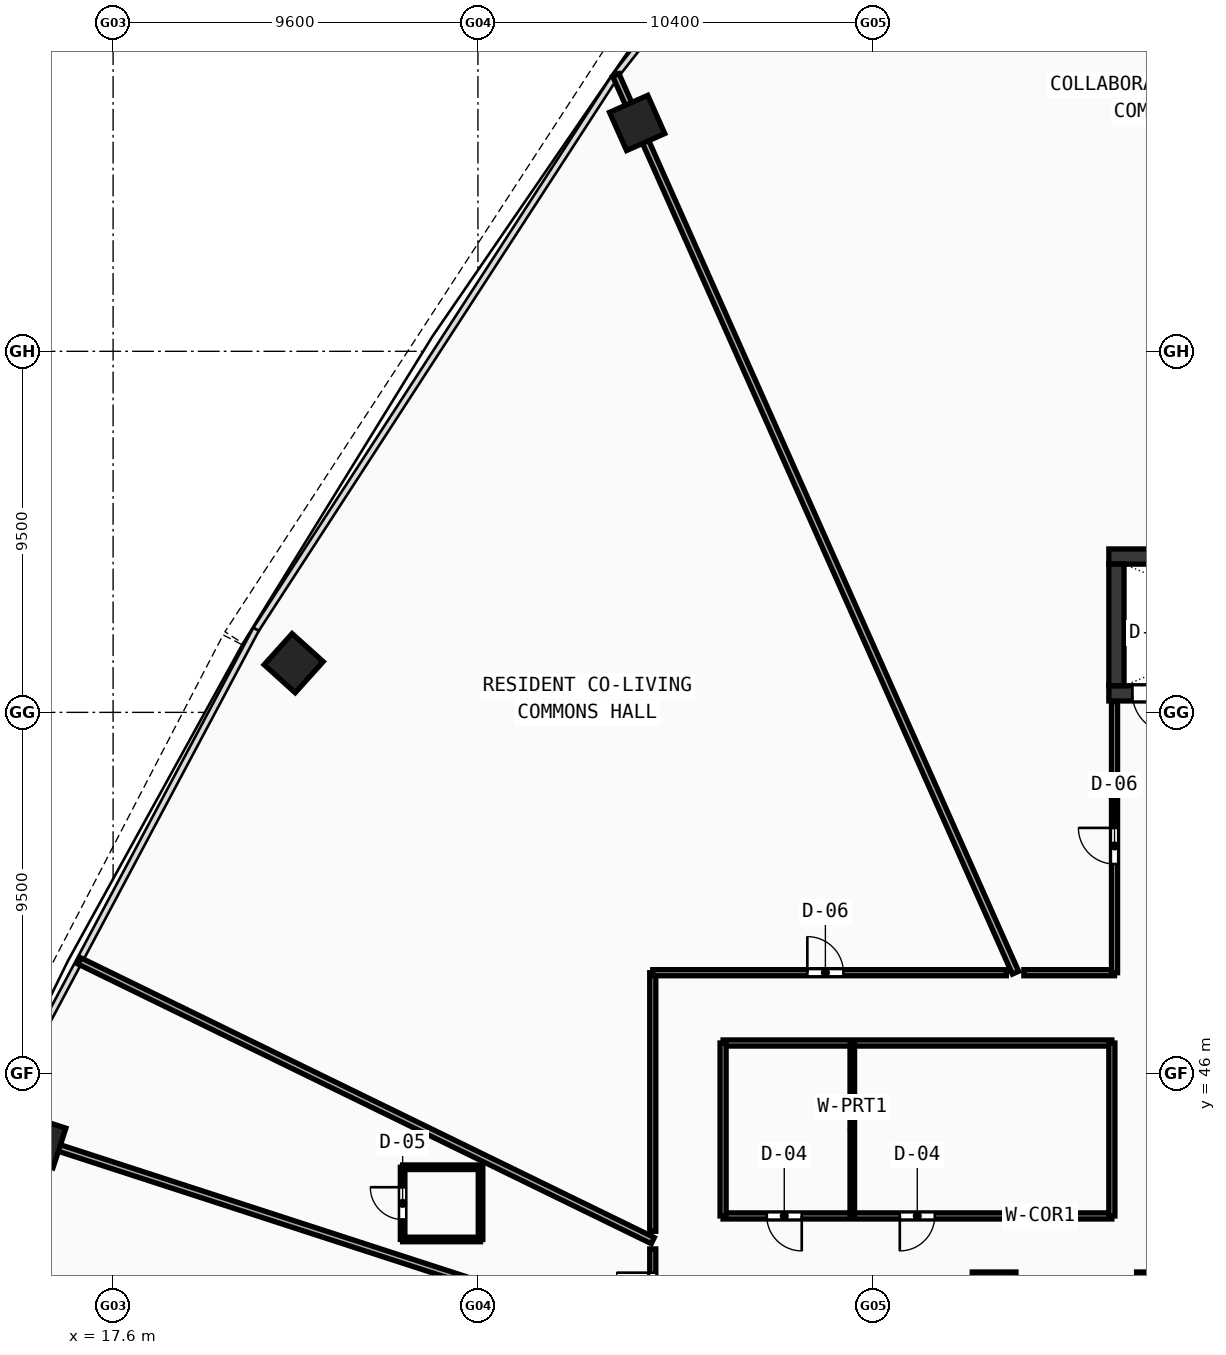
"""IFC4 building model, lengths in metres.
Left out: names, types, materials, properties, quantities, classifications, styles, units other than length and angle.
Written with IfcOpenShell. Run it as: python <this file> out.ifc"""

import sys

from ifc_helpers import new_model, si_unit, direction, frame, frame_2d, origin, origin_with_axes, origin_2d, place, context, subcontext, project, spatial, rectangle, hollow_rectangle, extrude, source, transform, mapped, element, fill, save


model = new_model("IFC4")
c1 = context("Model", 3, precision=1e-05, world=origin(), true_north=direction((0.0, 1.0)))
c2 = subcontext(c1, "Body", "Model", "MODEL_VIEW")
j1 = project(units=[si_unit("LENGTHUNIT", "METRE"), si_unit("PLANEANGLEUNIT", "RADIAN")], contexts=[c1])
p1 = place(None, origin())
s1 = spatial("IfcSite", under=j1, at=p1, CompositionType="ELEMENT")
p2 = place(p1, origin())
s2 = spatial("IfcBuilding", under=s1, at=p2, CompositionType="ELEMENT")
p3 = place(p2, frame((0.0, 0.0, 59.44)))
s3 = spatial("IfcBuildingStorey", under=s2, at=p3, CompositionType="ELEMENT", Elevation=59.44)
p4 = place(p3, frame((43.8, 59.6, 0.0), z_axis=(0.0, 0.0, 1.0), x_axis=(1.0, 0.0, 0.0)))
e1 = element("IfcWall", 1, at=p4, inside=s3, PredefinedType="SHEAR", context=c2, shape_type="SweptSolid", body=[
    extrude(rectangle(XDim=8.5, YDim=0.4, at=frame_2d((4.25, 0.0))), origin(), (0.0, 0.0, 1.0), 3.37),
])
p5 = place(p3, frame((43.8, 56.0, 0.0), z_axis=(0.0, 0.0, 1.0), x_axis=(1.0, 0.0, 0.0)))
e2 = element("IfcWall", 2, at=p5, inside=s3, PredefinedType="SHEAR", context=c2, shape_type="SweptSolid", body=[
    extrude(rectangle(XDim=8.5, YDim=0.4, at=frame_2d((4.25, 0.0))), origin(), (0.0, 0.0, 1.0), 3.37),
])
p6 = place(p5, frame((0.62, 0.0, 0.0)))
e3 = element("IfcOpeningElement", 3, at=p6, cuts=e2, PredefinedType="OPENING", context=c2, shape_type="SweptSolid", body=[
    extrude(rectangle(XDim=1.05, YDim=2.1, at=frame_2d((0.525, 1.05))), frame((0.0, 0.21, 0.0), z_axis=(0.0, -1.0, 0.0), x_axis=(1.0, 0.0, 0.0)), (0.0, 0.0, 1.0), 0.42),
])
p7 = place(p3, frame((44.0, 56.2, 0.0), z_axis=(0.0, 0.0, 1.0), x_axis=(0.0, 1.0, 0.0)))
e4 = element("IfcWall", 4, at=p7, inside=s3, PredefinedType="SHEAR", context=c2, shape_type="SweptSolid", body=[
    extrude(rectangle(XDim=3.2, YDim=0.4, at=frame_2d((1.6, 0.0))), origin(), (0.0, 0.0, 1.0), 3.37),
])
m1 = source(origin(), c2, "Body", "SweptSolid", [
    extrude(hollow_rectangle(XDim=1.15, YDim=1.15, WallThickness=0.048, at=origin_2d()), origin(), (0.0, 0.0, 1.0), 3.63),
])
for number, where, z_axis, x_axis in (
    (5, (45.106, 40.2, -0.26), (0.0, 0.0, 1.0), (1.0, 0.0, 0.0)),
    (6, (40.781, 40.2, -0.26), (0.0, 0.0, 1.0), (1.0, 0.0, 0.0)),
):
    element("IfcColumn", number, at=place(p3, frame(where, z_axis=z_axis, x_axis=x_axis)), inside=s3, PredefinedType="COLUMN", context=c2, shape_type="MappedRepresentation", body=[
        mapped(m1, transform((0.0, 0.0, 0.0), scale=1.0)),
    ])
m2 = source(origin(), c2, "Body", "SweptSolid", [
    extrude(hollow_rectangle(XDim=1.1, YDim=1.1, WallThickness=0.045, at=origin_2d()), origin(), (0.0, 0.0, 1.0), 3.63),
])
for number, where, z_axis, x_axis in (
    (7, (31.389, 71.009, -0.26), (0.0, 0.0, 1.0), (-0.914, -0.407, 0.0)),
    (8, (22.351, 56.794, -0.26), (0.0, 0.0, 1.0), (-0.669, -0.743, 0.0)),
    (9, (15.665, 44.206, -0.26), (0.0, 0.0, 1.0), (-0.309, -0.951, 0.0)),
):
    element("IfcColumn", number, at=place(p3, frame(where, z_axis=z_axis, x_axis=x_axis)), inside=s3, PredefinedType="COLUMN", context=c2, shape_type="MappedRepresentation", body=[
        mapped(m2, transform((0.0, 0.0, 0.0), scale=1.0)),
    ])
p8 = place(p3, frame((33.65, 42.25, 0.0), z_axis=(0.0, 0.0, 1.0), x_axis=(1.0, 0.0, 0.0)))
e10 = element("IfcWall", 10, at=p8, inside=s3, PredefinedType="PARTITIONING", context=c2, shape_type="SweptSolid", body=[
    extrude(rectangle(XDim=10.23, YDim=0.16, at=frame_2d((5.115, 0.0))), origin(), (0.0, 0.0, 1.0), 2.67),
])
p9 = place(p8, frame((1.15, 0.0, 0.0)))
e11 = element("IfcOpeningElement", 11, at=p9, cuts=e10, PredefinedType="OPENING", context=c2, shape_type="SweptSolid", body=[
    extrude(rectangle(XDim=0.92, YDim=2.1, at=frame_2d((0.46, 1.05))), frame((0.0, 0.09, 0.0), z_axis=(0.0, -1.0, 0.0), x_axis=(1.0, 0.0, 0.0)), (0.0, 0.0, 1.0), 0.18),
])
p10 = place(p8, frame((4.65, 0.0, 0.0)))
e12 = element("IfcOpeningElement", 12, at=p10, cuts=e10, PredefinedType="OPENING", context=c2, shape_type="SweptSolid", body=[
    extrude(rectangle(XDim=0.92, YDim=2.1, at=frame_2d((0.46, 1.05))), frame((0.0, 0.09, 0.0), z_axis=(0.0, -1.0, 0.0), x_axis=(1.0, 0.0, 0.0)), (0.0, 0.0, 1.0), 0.18),
])
p11 = place(p3, frame((33.65, 46.8, 0.0), z_axis=(0.0, 0.0, 1.0), x_axis=(1.0, 0.0, 0.0)))
e13 = element("IfcWall", 13, at=p11, inside=s3, PredefinedType="PARTITIONING", context=c2, shape_type="SweptSolid", body=[
    extrude(rectangle(XDim=10.23, YDim=0.16, at=frame_2d((5.115, 0.0))), origin(), (0.0, 0.0, 1.0), 2.67),
])
for number, where, z_axis, x_axis in (
    (14, (33.65, 42.25, 0.0), (0.0, 0.0, 1.0), (0.0, 1.0, 0.0)),
    (15, (43.88, 42.25, 0.0), (0.0, 0.0, 1.0), (0.0, 1.0, 0.0)),
):
    element("IfcWall", number, at=place(p3, frame(where, z_axis=z_axis, x_axis=x_axis)), inside=s3, PredefinedType="PARTITIONING", context=c2, shape_type="SweptSolid", body=[
        extrude(rectangle(XDim=4.55, YDim=0.16, at=frame_2d((2.275, 0.0))), origin(), (0.0, 0.0, 1.0), 2.67),
    ])
p12 = place(p3, frame((37.05, 42.25, 0.0), z_axis=(0.0, 0.0, 1.0), x_axis=(0.0, 1.0, 0.0)))
e16 = element("IfcWall", 16, at=p12, inside=s3, PredefinedType="PARTITIONING", context=c2, shape_type="SweptSolid", body=[
    extrude(rectangle(XDim=4.55, YDim=0.12, at=frame_2d((2.275, 0.0))), origin(), (0.0, 0.0, 1.0), 2.67),
])
p13 = place(p3, frame((41.344, 48.65, 0.0), z_axis=(0.0, 0.0, 1.0), x_axis=(-0.406729800422, 0.913548504158, 0.0)))
e17 = element("IfcWall", 17, at=p13, inside=s3, PredefinedType="PARTITIONING", context=c2, shape_type="SweptSolid", body=[
    extrude(rectangle(XDim=25.854, YDim=0.18, at=frame_2d((12.927, 0.0))), origin(), (0.0, 0.0, 1.0), 2.67),
])
p14 = place(p3, frame((31.8, 41.601, 0.0), z_axis=(0.0, 0.0, 1.0), x_axis=(-0.898795978277, 0.438367185625, 0.0)))
e18 = element("IfcWall", 18, at=p14, inside=s3, PredefinedType="PARTITIONING", context=c2, shape_type="SweptSolid", body=[
    extrude(rectangle(XDim=16.788, YDim=0.18, at=frame_2d((8.394, 0.0))), origin(), (0.0, 0.0, 1.0), 2.67),
])
p15 = place(p3, frame((31.8, 38.964, 0.0), z_axis=(0.0, 0.0, 1.0), x_axis=(-0.951052304058, 0.309029958006, 0.0)))
e19 = element("IfcWall", 19, at=p15, inside=s3, PredefinedType="PARTITIONING", context=c2, shape_type="SweptSolid", body=[
    extrude(rectangle(XDim=18.299, YDim=0.18, at=frame_2d((9.149, 0.0))), origin(), (0.0, 0.0, 1.0), 2.67),
])
p16 = place(p3, frame((31.8, 39.195, 0.0), z_axis=(0.0, 0.0, 1.0), x_axis=(0.0, 1.0, 0.0)))
e20 = element("IfcWall", 20, at=p16, inside=s3, PredefinedType="PARTITIONING", context=c2, shape_type="SweptSolid", body=[
    extrude(rectangle(XDim=2.187, YDim=0.16, at=frame_2d((1.093, 0.0))), origin(), (0.0, 0.0, 1.0), 3.37),
])
p17 = place(p16, frame((0.613, 0.0, 0.0)))
e21 = element("IfcOpeningElement", 21, at=p17, cuts=e20, PredefinedType="OPENING", context=c2, shape_type="SweptSolid", body=[
    extrude(rectangle(XDim=0.95, YDim=2.1, at=frame_2d((0.475, 1.05))), frame((0.0, 0.09, 0.0), z_axis=(0.0, -1.0, 0.0), x_axis=(1.0, 0.0, 0.0)), (0.0, 0.0, 1.0), 0.18),
])
p18 = place(p3, frame((31.8, 41.846, 0.0), z_axis=(0.0, 0.0, 1.0), x_axis=(0.0, 1.0, 0.0)))
e22 = element("IfcWall", 22, at=p18, inside=s3, PredefinedType="PARTITIONING", context=c2, shape_type="SweptSolid", body=[
    extrude(rectangle(XDim=6.804, YDim=0.16, at=frame_2d((3.402, 0.0))), origin(), (0.0, 0.0, 1.0), 2.67),
])
p19 = place(p3, frame((31.8, 48.65, 0.0), z_axis=(0.0, 0.0, 1.0), x_axis=(1.0, 0.0, 0.0)))
e23 = element("IfcWall", 23, at=p19, inside=s3, PredefinedType="PARTITIONING", context=c2, shape_type="SweptSolid", body=[
    extrude(rectangle(XDim=9.303, YDim=0.16, at=frame_2d((4.651, 0.0))), origin(), (0.0, 0.0, 1.0), 2.97),
])
p20 = place(p19, frame((4.067, 0.0, 0.0)))
e24 = element("IfcOpeningElement", 24, at=p20, cuts=e23, PredefinedType="OPENING", context=c2, shape_type="SweptSolid", body=[
    extrude(rectangle(XDim=0.95, YDim=2.1, at=frame_2d((0.475, 1.05))), frame((0.0, 0.09, 0.0), z_axis=(0.0, -1.0, 0.0), x_axis=(1.0, 0.0, 0.0)), (0.0, 0.0, 1.0), 0.18),
])
p21 = place(p3, frame((41.564, 48.65, 0.0), z_axis=(0.0, 0.0, 1.0), x_axis=(1.0, 0.0, 0.0)))
e25 = element("IfcWall", 25, at=p21, inside=s3, PredefinedType="PARTITIONING", context=c2, shape_type="SweptSolid", body=[
    extrude(rectangle(XDim=2.386, YDim=0.16, at=frame_2d((1.193, 0.0))), origin(), (0.0, 0.0, 1.0), 2.67),
])
p22 = place(p3, frame((43.95, 48.65, 0.0), z_axis=(0.0, 0.0, 1.0), x_axis=(0.0, 1.0, 0.0)))
e26 = element("IfcWall", 26, at=p22, inside=s3, PredefinedType="PARTITIONING", context=c2, shape_type="SweptSolid", body=[
    extrude(rectangle(XDim=7.13, YDim=0.16, at=frame_2d((3.565, 0.0))), origin(), (0.0, 0.0, 1.0), 2.97),
])
p23 = place(p22, frame((2.86, 0.0, 0.0)))
e27 = element("IfcOpeningElement", 27, at=p23, cuts=e26, PredefinedType="OPENING", context=c2, shape_type="SweptSolid", body=[
    extrude(rectangle(XDim=0.95, YDim=2.1, at=frame_2d((0.475, 1.05))), frame((0.0, 0.09, 0.0), z_axis=(0.0, -1.0, 0.0), x_axis=(1.0, 0.0, 0.0)), (0.0, 0.0, 1.0), 0.18),
])
p24 = place(p3, frame((25.218, 41.631, 0.0), z_axis=(0.0, 0.0, 1.0), x_axis=(1.0, 0.0, 0.0)))
e28 = element("IfcWall", 28, at=p24, inside=s3, PredefinedType="PARTITIONING", context=c2, shape_type="SweptSolid", body=[
    extrude(rectangle(XDim=2.05, YDim=0.12, at=frame_2d((1.025, 0.0))), origin(), (0.0, 0.0, 1.0), 3.37),
])
p25 = place(p3, frame((27.268, 41.631, 0.0), z_axis=(0.0, 0.0, 1.0), x_axis=(0.0, 1.0, 0.0)))
e29 = element("IfcWall", 29, at=p25, inside=s3, PredefinedType="PARTITIONING", context=c2, shape_type="SweptSolid", body=[
    extrude(rectangle(XDim=1.9, YDim=0.12, at=frame_2d((0.95, 0.0))), origin(), (0.0, 0.0, 1.0), 3.37),
])
p26 = place(p3, frame((27.268, 43.531, 0.0), z_axis=(0.0, 0.0, 1.0), x_axis=(-1.0, 0.0, 0.0)))
e30 = element("IfcWall", 30, at=p26, inside=s3, PredefinedType="PARTITIONING", context=c2, shape_type="SweptSolid", body=[
    extrude(rectangle(XDim=2.05, YDim=0.12, at=frame_2d((1.025, 0.0))), origin(), (0.0, 0.0, 1.0), 3.37),
])
p27 = place(p3, frame((25.218, 43.531, 0.0), z_axis=(0.0, 0.0, 1.0), x_axis=(0.0, -1.0, 0.0)))
e31 = element("IfcWall", 31, at=p27, inside=s3, PredefinedType="PARTITIONING", context=c2, shape_type="SweptSolid", body=[
    extrude(rectangle(XDim=1.9, YDim=0.12, at=frame_2d((0.95, 0.0))), origin(), (0.0, 0.0, 1.0), 3.37),
])
p28 = place(p27, frame((0.525, 0.0, 0.0)))
e32 = element("IfcOpeningElement", 32, at=p28, cuts=e31, PredefinedType="OPENING", context=c2, shape_type="SweptSolid", body=[
    extrude(rectangle(XDim=0.85, YDim=2.1, at=frame_2d((0.425, 1.05))), frame((0.0, 0.07, 0.0), z_axis=(0.0, -1.0, 0.0), x_axis=(1.0, 0.0, 0.0)), (0.0, 0.0, 1.0), 0.14),
])
m3 = source(origin(), c2, "Body", "SweptSolid", [
    extrude(rectangle(XDim=1.05, YDim=2.1, at=frame_2d((0.525, 1.05))), frame((0.0, 0.025, 0.0), z_axis=(0.0, -1.0, 0.0), x_axis=(1.0, 0.0, 0.0)), (0.0, 0.0, 1.0), 0.05),
])
p29 = place(p6, frame((1.05, 0.0, 0.0), z_axis=(0.0, 0.0, 1.0), x_axis=(-1.0, 0.0, 0.0)))
e33 = element("IfcDoor", 33, at=p29, inside=s3, OperationType="SINGLE_SWING_LEFT", PredefinedType="DOOR", context=c2, shape_type="MappedRepresentation", body=[
    mapped(m3, transform((0.0, 0.0, 0.0), scale=1.0)),
])
fill(e3, e33)
m4 = source(origin(), c2, "Body", "SweptSolid", [
    extrude(rectangle(XDim=0.92, YDim=2.1, at=frame_2d((0.46, 1.05))), frame((0.0, 0.025, 0.0), z_axis=(0.0, -1.0, 0.0), x_axis=(1.0, 0.0, 0.0)), (0.0, 0.0, 1.0), 0.05),
])
p30 = place(p9, frame((0.92, 0.0, 0.0), z_axis=(0.0, 0.0, 1.0), x_axis=(-1.0, 0.0, 0.0)))
e34 = element("IfcDoor", 34, at=p30, inside=s3, OperationType="SINGLE_SWING_LEFT", PredefinedType="DOOR", context=c2, shape_type="MappedRepresentation", body=[
    mapped(m4, transform((0.0, 0.0, 0.0), scale=1.0)),
])
fill(e11, e34)
p31 = place(p10, frame((0.92, 0.0, 0.0), z_axis=(0.0, 0.0, 1.0), x_axis=(-1.0, 0.0, 0.0)))
e35 = element("IfcDoor", 35, at=p31, inside=s3, OperationType="SINGLE_SWING_RIGHT", PredefinedType="DOOR", context=c2, shape_type="MappedRepresentation", body=[
    mapped(m4, transform((0.0, 0.0, 0.0), scale=1.0)),
])
fill(e12, e35)
m5 = source(origin(), c2, "Body", "SweptSolid", [
    extrude(rectangle(XDim=0.95, YDim=2.1, at=frame_2d((0.475, 1.05))), frame((0.0, 0.025, 0.0), z_axis=(0.0, -1.0, 0.0), x_axis=(1.0, 0.0, 0.0)), (0.0, 0.0, 1.0), 0.05),
])
p32 = place(p23, origin_with_axes())
e36 = element("IfcDoor", 36, at=p32, inside=s3, OperationType="SINGLE_SWING_RIGHT", PredefinedType="DOOR", context=c2, shape_type="MappedRepresentation", body=[
    mapped(m5, transform((0.0, 0.0, 0.0), scale=1.0)),
])
fill(e27, e36)
p33 = place(p20, origin_with_axes())
e37 = element("IfcDoor", 37, at=p33, inside=s3, OperationType="SINGLE_SWING_LEFT", PredefinedType="DOOR", context=c2, shape_type="MappedRepresentation", body=[
    mapped(m5, transform((0.0, 0.0, 0.0), scale=1.0)),
])
fill(e24, e37)
p34 = place(p17, origin_with_axes())
e38 = element("IfcDoor", 38, at=p34, inside=s3, OperationType="SINGLE_SWING_RIGHT", PredefinedType="DOOR", context=c2, shape_type="MappedRepresentation", body=[
    mapped(m5, transform((0.0, 0.0, 0.0), scale=1.0)),
])
fill(e21, e38)
m6 = source(origin(), c2, "Body", "SweptSolid", [
    extrude(rectangle(XDim=0.85, YDim=2.1, at=frame_2d((0.425, 1.05))), frame((0.0, 0.025, 0.0), z_axis=(0.0, -1.0, 0.0), x_axis=(1.0, 0.0, 0.0)), (0.0, 0.0, 1.0), 0.05),
])
p35 = place(p28, frame((0.85, 0.0, 0.0), z_axis=(0.0, 0.0, 1.0), x_axis=(-1.0, 0.0, 0.0)))
e39 = element("IfcDoor", 39, at=p35, inside=s3, OperationType="SINGLE_SWING_RIGHT", PredefinedType="DOOR", context=c2, shape_type="MappedRepresentation", body=[
    mapped(m6, transform((0.0, 0.0, 0.0), scale=1.0)),
])
fill(e32, e39)
save(model, sys.argv[1])
